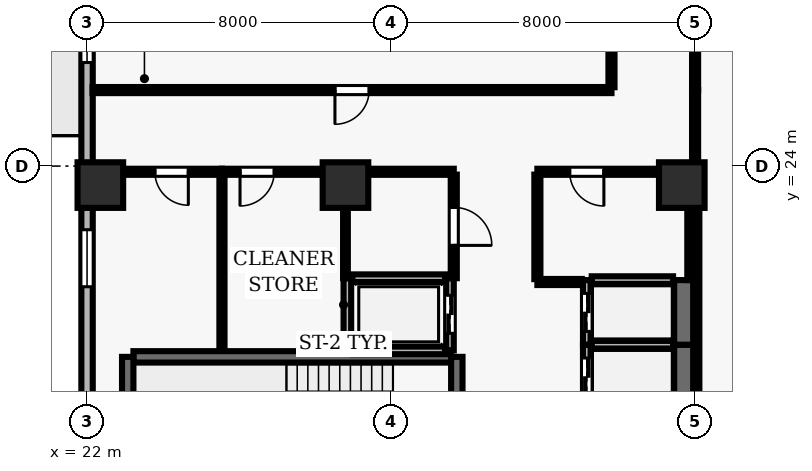
"""IFC4 building model, lengths in metres.
Left out: names, types, materials, properties, quantities, classifications, styles, units other than length and angle.
Written with IfcOpenShell. Run it as: python <this file> out.ifc"""

import sys

from ifc_helpers import new_model, si_unit, direction, frame, frame_2d, origin, origin_2d, place, context, subcontext, project, spatial, rectangle, extrude, element, fill, save


model = new_model("IFC4")
c1 = context("Model", 3, precision=1e-05, world=origin(), true_north=direction((0.0, 1.0)))
c2 = subcontext(c1, "Body", "Model", "MODEL_VIEW")
j1 = project(units=[si_unit("LENGTHUNIT", "METRE"), si_unit("PLANEANGLEUNIT", "RADIAN")], contexts=[c1])
p1 = place(None, origin())
s1 = spatial("IfcSite", under=j1, at=p1, CompositionType="ELEMENT")
p2 = place(p1, origin())
s2 = spatial("IfcBuilding", under=s1, at=p2, CompositionType="ELEMENT")
p3 = place(p2, frame((0.0, 0.0, 122.9)))
s3 = spatial("IfcBuildingStorey", under=s2, at=p3, CompositionType="ELEMENT", Elevation=122.9)
for number, where, z_axis, x_axis in (
    (1, (22.35, 23.5, 0.0), (0.0, 0.0, 1.0), (1.0, 0.0, 0.0)),
    (2, (28.8, 23.5, 0.0), (0.0, 0.0, 1.0), (1.0, 0.0, 0.0)),
    (3, (37.65, 23.5, 0.0), (0.0, 0.0, 1.0), (1.0, 0.0, 0.0)),
):
    element("IfcColumn", number, at=place(p3, frame(where, z_axis=z_axis, x_axis=x_axis)), inside=s3, PredefinedType="COLUMN", context=c2, shape_type="SweptSolid", body=[
        extrude(rectangle(XDim=1.2, YDim=1.2, at=origin_2d()), origin(), (0.0, 0.0, 1.0), 3.9),
    ])
p4 = place(p3, frame((22.0, 46.1, 0.0), z_axis=(0.0, 0.0, 1.0), x_axis=(0.0, -1.0, 0.0)))
e4 = element("IfcWall", 4, at=p4, inside=s3, PredefinedType="SOLIDWALL", context=c2, shape_type="SweptSolid", body=[
    extrude(rectangle(XDim=43.6, YDim=0.3, at=frame_2d((21.8, 0.0))), origin(), (0.0, 0.0, 1.0), 3.69),
])
p5 = place(p4, frame((12.7, 0.0, 0.0)))
e5 = element("IfcOpeningElement", 5, at=p5, cuts=e4, PredefinedType="OPENING", context=c2, shape_type="SweptSolid", body=[
    extrude(rectangle(XDim=1.0, YDim=2.2, at=frame_2d((0.5, 1.1))), frame((0.0, 0.16, 0.0), z_axis=(0.0, -1.0, 0.0), x_axis=(1.0, 0.0, 0.0)), (0.0, 0.0, 1.0), 0.32),
])
p6 = place(p4, frame((1.975, 0.0, 0.9)))
e6 = element("IfcOpeningElement", 6, at=p6, cuts=e4, PredefinedType="OPENING", context=c2, shape_type="SweptSolid", body=[
    extrude(rectangle(XDim=1.5, YDim=1.8, at=frame_2d((0.75, 0.9))), frame((0.0, 0.16, 0.0), z_axis=(0.0, -1.0, 0.0), x_axis=(1.0, 0.0, 0.0)), (0.0, 0.0, 1.0), 0.32),
])
p7 = place(p4, frame((6.975, 0.0, 0.9)))
e7 = element("IfcOpeningElement", 7, at=p7, cuts=e4, PredefinedType="OPENING", context=c2, shape_type="SweptSolid", body=[
    extrude(rectangle(XDim=1.5, YDim=1.8, at=frame_2d((0.75, 0.9))), frame((0.0, 0.16, 0.0), z_axis=(0.0, -1.0, 0.0), x_axis=(1.0, 0.0, 0.0)), (0.0, 0.0, 1.0), 0.32),
])
p8 = place(p4, frame((17.875, 0.0, 0.9)))
e8 = element("IfcOpeningElement", 8, at=p8, cuts=e4, PredefinedType="OPENING", context=c2, shape_type="SweptSolid", body=[
    extrude(rectangle(XDim=1.5, YDim=1.8, at=frame_2d((0.75, 0.9))), frame((0.0, 0.16, 0.0), z_axis=(0.0, -1.0, 0.0), x_axis=(1.0, 0.0, 0.0)), (0.0, 0.0, 1.0), 0.32),
])
p9 = place(p4, frame((23.775, 0.0, 0.9)))
e9 = element("IfcOpeningElement", 9, at=p9, cuts=e4, PredefinedType="OPENING", context=c2, shape_type="SweptSolid", body=[
    extrude(rectangle(XDim=1.5, YDim=1.8, at=frame_2d((0.75, 0.9))), frame((0.0, 0.16, 0.0), z_axis=(0.0, -1.0, 0.0), x_axis=(1.0, 0.0, 0.0)), (0.0, 0.0, 1.0), 0.32),
])
p10 = place(p4, frame((28.775, 0.0, 0.9)))
e10 = element("IfcOpeningElement", 10, at=p10, cuts=e4, PredefinedType="OPENING", context=c2, shape_type="SweptSolid", body=[
    extrude(rectangle(XDim=1.5, YDim=1.8, at=frame_2d((0.75, 0.9))), frame((0.0, 0.16, 0.0), z_axis=(0.0, -1.0, 0.0), x_axis=(1.0, 0.0, 0.0)), (0.0, 0.0, 1.0), 0.32),
])
p11 = place(p4, frame((34.675, 0.0, 0.9)))
e11 = element("IfcOpeningElement", 11, at=p11, cuts=e4, PredefinedType="OPENING", context=c2, shape_type="SweptSolid", body=[
    extrude(rectangle(XDim=1.5, YDim=1.8, at=frame_2d((0.75, 0.9))), frame((0.0, 0.16, 0.0), z_axis=(0.0, -1.0, 0.0), x_axis=(1.0, 0.0, 0.0)), (0.0, 0.0, 1.0), 0.32),
])
p12 = place(p3, frame((31.58, 18.98, 0.0), z_axis=(0.0, 0.0, 1.0), x_axis=(-1.0, 0.0, 0.0)))
e12 = element("IfcWall", 12, at=p12, inside=s3, PredefinedType="SHEAR", context=c2, shape_type="SweptSolid", body=[
    extrude(rectangle(XDim=8.36, YDim=0.3, at=frame_2d((4.18, 0.0))), origin(), (0.0, 0.0, 1.0), 3.69),
])
p13 = place(p3, frame((23.07, 18.98, 0.0), z_axis=(0.0, 0.0, 1.0), x_axis=(0.0, -1.0, 0.0)))
e13 = element("IfcWall", 13, at=p13, inside=s3, PredefinedType="SHEAR", context=c2, shape_type="SweptSolid", body=[
    extrude(rectangle(XDim=3.51, YDim=0.3, at=frame_2d((1.755, 0.0))), origin(), (0.0, 0.0, 1.0), 3.69),
])
p14 = place(p3, frame((31.73, 15.47, 0.0), z_axis=(0.0, 0.0, 1.0), x_axis=(0.0, 1.0, 0.0)))
e14 = element("IfcWall", 14, at=p14, inside=s3, PredefinedType="SHEAR", context=c2, shape_type="SweptSolid", body=[
    extrude(rectangle(XDim=3.51, YDim=0.3, at=frame_2d((1.755, 0.0))), origin(), (0.0, 0.0, 1.0), 3.69),
])
p15 = place(p14, frame((1.18, 0.0, 0.0)))
e15 = element("IfcOpeningElement", 15, at=p15, cuts=e14, PredefinedType="OPENING", context=c2, shape_type="SweptSolid", body=[
    extrude(rectangle(XDim=1.15, YDim=2.15, at=frame_2d((0.575, 1.075))), frame((0.0, 0.16, 0.0), z_axis=(0.0, -1.0, 0.0), x_axis=(1.0, 0.0, 0.0)), (0.0, 0.0, 1.0), 0.32),
])
p16 = place(p3, frame((35.15, 19.3, 0.0), z_axis=(0.0, 0.0, 1.0), x_axis=(0.0, -1.0, 0.0)))
e16 = element("IfcWall", 16, at=p16, inside=s3, PredefinedType="SOLIDWALL", context=c2, shape_type="SweptSolid", body=[
    extrude(rectangle(XDim=1.7, YDim=0.2, at=frame_2d((0.85, 0.0))), origin(), (0.0, 0.0, 1.0), 3.69),
])
p17 = place(p16, frame((0.35, 0.0, 0.0)))
e17 = element("IfcOpeningElement", 17, at=p17, cuts=e16, PredefinedType="OPENING", context=c2, shape_type="SweptSolid", body=[
    extrude(rectangle(XDim=1.0, YDim=2.1, at=frame_2d((0.5, 1.05))), frame((0.0, 0.11, 0.0), z_axis=(0.0, -1.0, 0.0), x_axis=(1.0, 0.0, 0.0)), (0.0, 0.0, 1.0), 0.22),
])
p18 = place(p3, frame((37.7, 17.6, 0.0), z_axis=(0.0, 0.0, 1.0), x_axis=(0.0, 1.0, 0.0)))
e18 = element("IfcWall", 18, at=p18, inside=s3, PredefinedType="SHEAR", context=c2, shape_type="SweptSolid", body=[
    extrude(rectangle(XDim=1.7, YDim=0.5, at=frame_2d((0.85, 0.0))), origin(), (0.0, 0.0, 1.0), 3.69),
])
p19 = place(p3, frame((37.42, 19.3, 0.0), z_axis=(0.0, 0.0, 1.0), x_axis=(-1.0, 0.0, 0.0)))
e19 = element("IfcWall", 19, at=p19, inside=s3, PredefinedType="SOLIDWALL", context=c2, shape_type="SweptSolid", body=[
    extrude(rectangle(XDim=2.14, YDim=0.2, at=frame_2d((1.07, 0.0))), origin(), (0.0, 0.0, 1.0), 3.69),
])
p20 = place(p3, frame((35.15, 21.0, 0.0), z_axis=(0.0, 0.0, 1.0), x_axis=(0.0, -1.0, 0.0)))
e20 = element("IfcWall", 20, at=p20, inside=s3, PredefinedType="SOLIDWALL", context=c2, shape_type="SweptSolid", body=[
    extrude(rectangle(XDim=1.7, YDim=0.2, at=frame_2d((0.85, 0.0))), origin(), (0.0, 0.0, 1.0), 3.69),
])
p21 = place(p20, frame((0.35, 0.0, 0.0)))
e21 = element("IfcOpeningElement", 21, at=p21, cuts=e20, PredefinedType="OPENING", context=c2, shape_type="SweptSolid", body=[
    extrude(rectangle(XDim=1.0, YDim=2.1, at=frame_2d((0.5, 1.05))), frame((0.0, 0.11, 0.0), z_axis=(0.0, -1.0, 0.0), x_axis=(1.0, 0.0, 0.0)), (0.0, 0.0, 1.0), 0.22),
])
p22 = place(p3, frame((37.7, 19.3, 0.0), z_axis=(0.0, 0.0, 1.0), x_axis=(0.0, 1.0, 0.0)))
e22 = element("IfcWall", 22, at=p22, inside=s3, PredefinedType="SHEAR", context=c2, shape_type="SweptSolid", body=[
    extrude(rectangle(XDim=1.7, YDim=0.5, at=frame_2d((0.85, 0.0))), origin(), (0.0, 0.0, 1.0), 3.69),
])
p23 = place(p3, frame((37.42, 21.0, 0.0), z_axis=(0.0, 0.0, 1.0), x_axis=(-1.0, 0.0, 0.0)))
e23 = element("IfcWall", 23, at=p23, inside=s3, PredefinedType="SOLIDWALL", context=c2, shape_type="SweptSolid", body=[
    extrude(rectangle(XDim=2.14, YDim=0.2, at=frame_2d((1.07, 0.0))), origin(), (0.0, 0.0, 1.0), 3.69),
])
p24 = place(p3, frame((28.85, 21.05, 0.0), z_axis=(0.0, 0.0, 1.0), x_axis=(0.0, -1.0, 0.0)))
e24 = element("IfcWall", 24, at=p24, inside=s3, PredefinedType="SOLIDWALL", context=c2, shape_type="SweptSolid", body=[
    extrude(rectangle(XDim=1.9, YDim=0.2, at=frame_2d((0.95, 0.0))), origin(), (0.0, 0.0, 1.0), 3.69),
])
p25 = place(p3, frame((31.55, 19.15, 0.0), z_axis=(0.0, 0.0, 1.0), x_axis=(0.0, 1.0, 0.0)))
e25 = element("IfcWall", 25, at=p25, inside=s3, PredefinedType="SOLIDWALL", context=c2, shape_type="SweptSolid", body=[
    extrude(rectangle(XDim=1.9, YDim=0.2, at=frame_2d((0.95, 0.0))), origin(), (0.0, 0.0, 1.0), 3.69),
])
p26 = place(p25, frame((0.45, 0.0, 0.0)))
e26 = element("IfcOpeningElement", 26, at=p26, cuts=e25, PredefinedType="OPENING", context=c2, shape_type="SweptSolid", body=[
    extrude(rectangle(XDim=1.0, YDim=2.1, at=frame_2d((0.5, 1.05))), frame((0.0, 0.11, 0.0), z_axis=(0.0, -1.0, 0.0), x_axis=(1.0, 0.0, 0.0)), (0.0, 0.0, 1.0), 0.22),
])
for number, where, z_axis, x_axis in (
    (27, (28.98, 19.15, 0.0), (0.0, 0.0, 1.0), (1.0, 0.0, 0.0)),
    (28, (31.42, 21.05, 0.0), (0.0, 0.0, 1.0), (-1.0, 0.0, 0.0)),
):
    element("IfcWall", number, at=place(p3, frame(where, z_axis=z_axis, x_axis=x_axis)), inside=s3, PredefinedType="SOLIDWALL", context=c2, shape_type="SweptSolid", body=[
        extrude(rectangle(XDim=2.44, YDim=0.2, at=frame_2d((1.22, 0.0))), origin(), (0.0, 0.0, 1.0), 3.69),
    ])
p27 = place(p3, frame((25.55, 23.85, 0.0), z_axis=(0.0, 0.0, 1.0), x_axis=(-1.0, 0.0, 0.0)))
e29 = element("IfcWall", 29, at=p27, inside=s3, PredefinedType="PARTITIONING", context=c2, shape_type="SweptSolid", body=[
    extrude(rectangle(XDim=3.35, YDim=0.16, at=frame_2d((1.675, 0.0))), origin(), (0.0, 0.0, 1.0), 3.073),
])
p28 = place(p27, frame((0.885, 0.0, 0.0)))
e30 = element("IfcOpeningElement", 30, at=p28, cuts=e29, PredefinedType="OPENING", context=c2, shape_type="SweptSolid", body=[
    extrude(rectangle(XDim=0.88, YDim=2.1, at=frame_2d((0.44, 1.05))), frame((0.0, 0.09, 0.0), z_axis=(0.0, -1.0, 0.0), x_axis=(1.0, 0.0, 0.0)), (0.0, 0.0, 1.0), 0.18),
])
p29 = place(p3, frame((28.8, 23.85, 0.0), z_axis=(0.0, 0.0, 1.0), x_axis=(-1.0, 0.0, 0.0)))
e31 = element("IfcWall", 31, at=p29, inside=s3, PredefinedType="PARTITIONING", context=c2, shape_type="SweptSolid", body=[
    extrude(rectangle(XDim=3.25, YDim=0.16, at=frame_2d((1.625, 0.0))), origin(), (0.0, 0.0, 1.0), 3.073),
])
p30 = place(p29, frame((1.875, 0.0, 0.0)))
e32 = element("IfcOpeningElement", 32, at=p30, cuts=e31, PredefinedType="OPENING", context=c2, shape_type="SweptSolid", body=[
    extrude(rectangle(XDim=0.9, YDim=2.1, at=frame_2d((0.45, 1.05))), frame((0.0, 0.09, 0.0), z_axis=(0.0, -1.0, 0.0), x_axis=(1.0, 0.0, 0.0)), (0.0, 0.0, 1.0), 0.18),
])
p31 = place(p3, frame((31.65, 23.85, 0.0), z_axis=(0.0, 0.0, 1.0), x_axis=(-1.0, 0.0, 0.0)))
e33 = element("IfcWall", 33, at=p31, inside=s3, PredefinedType="PARTITIONING", context=c2, shape_type="SweptSolid", body=[
    extrude(rectangle(XDim=2.85, YDim=0.16, at=frame_2d((1.425, 0.0))), origin(), (0.0, 0.0, 1.0), 3.073),
])
p32 = place(p3, frame((35.02, 20.95, 0.0), z_axis=(0.0, 0.0, 1.0), x_axis=(-1.0, 0.0, 0.0)))
e34 = element("IfcWall", 34, at=p32, inside=s3, PredefinedType="PARTITIONING", context=c2, shape_type="SweptSolid", body=[
    extrude(rectangle(XDim=1.17, YDim=0.16, at=frame_2d((0.585, 0.0))), origin(), (0.0, 0.0, 1.0), 3.69),
])
p33 = place(p3, frame((35.8, 26.0, 0.0), z_axis=(0.0, 0.0, 1.0), x_axis=(-1.0, 0.0, 0.0)))
e35 = element("IfcWall", 35, at=p33, inside=s3, PredefinedType="PARTITIONING", context=c2, shape_type="SweptSolid", body=[
    extrude(rectangle(XDim=13.655, YDim=0.16, at=frame_2d((6.828, 0.0))), origin(), (0.0, 0.0, 1.0), 3.69),
])
p34 = place(p33, frame((6.377, 0.0, 0.0)))
e36 = element("IfcOpeningElement", 36, at=p34, cuts=e35, PredefinedType="OPENING", context=c2, shape_type="SweptSolid", body=[
    extrude(rectangle(XDim=0.9, YDim=2.1, at=frame_2d((0.45, 1.05))), frame((0.0, 0.09, 0.0), z_axis=(0.0, -1.0, 0.0), x_axis=(1.0, 0.0, 0.0)), (0.0, 0.0, 1.0), 0.18),
])
p35 = place(p3, frame((37.85, 23.85, 0.0), z_axis=(0.0, 0.0, 1.0), x_axis=(-1.0, 0.0, 0.0)))
e37 = element("IfcWall", 37, at=p35, inside=s3, PredefinedType="PARTITIONING", context=c2, shape_type="SweptSolid", body=[
    extrude(rectangle(XDim=4.0, YDim=0.16, at=frame_2d((2.0, 0.0))), origin(), (0.0, 0.0, 1.0), 3.073),
])
p36 = place(p35, frame((2.25, 0.0, 0.0)))
e38 = element("IfcOpeningElement", 38, at=p36, cuts=e37, PredefinedType="OPENING", context=c2, shape_type="SweptSolid", body=[
    extrude(rectangle(XDim=0.9, YDim=2.1, at=frame_2d((0.45, 1.05))), frame((0.0, 0.09, 0.0), z_axis=(0.0, -1.0, 0.0), x_axis=(1.0, 0.0, 0.0)), (0.0, 0.0, 1.0), 0.18),
])
p37 = place(p3, frame((25.55, 19.16, 0.0), z_axis=(0.0, 0.0, 1.0), x_axis=(0.0, 1.0, 0.0)))
e39 = element("IfcWall", 39, at=p37, inside=s3, PredefinedType="PARTITIONING", context=c2, shape_type="SweptSolid", body=[
    extrude(rectangle(XDim=4.615, YDim=0.135, at=frame_2d((2.308, 0.0))), origin(), (0.0, 0.0, 1.0), 3.69),
])
p38 = place(p3, frame((28.8, 23.775, 0.0), z_axis=(0.0, 0.0, 1.0), x_axis=(0.0, -1.0, 0.0)))
e40 = element("IfcWall", 40, at=p38, inside=s3, PredefinedType="PARTITIONING", context=c2, shape_type="SweptSolid", body=[
    extrude(rectangle(XDim=2.725, YDim=0.125, at=frame_2d((1.362, 0.0))), origin(), (0.0, 0.0, 1.0), 3.69),
])
p39 = place(p3, frame((31.65, 23.775, 0.0), z_axis=(0.0, 0.0, 1.0), x_axis=(0.0, -1.0, 0.0)))
e41 = element("IfcWall", 41, at=p39, inside=s3, PredefinedType="PARTITIONING", context=c2, shape_type="SweptSolid", body=[
    extrude(rectangle(XDim=2.725, YDim=0.16, at=frame_2d((1.362, 0.0))), origin(), (0.0, 0.0, 1.0), 3.69),
])
p40 = place(p39, frame((0.862, 0.0, 0.0)))
e42 = element("IfcOpeningElement", 42, at=p40, cuts=e41, PredefinedType="OPENING", context=c2, shape_type="SweptSolid", body=[
    extrude(rectangle(XDim=1.0, YDim=2.1, at=frame_2d((0.5, 1.05))), frame((0.0, 0.09, 0.0), z_axis=(0.0, -1.0, 0.0), x_axis=(1.0, 0.0, 0.0)), (0.0, 0.0, 1.0), 0.18),
])
p41 = place(p3, frame((33.85, 21.025, 0.0), z_axis=(0.0, 0.0, 1.0), x_axis=(0.0, 1.0, 0.0)))
e43 = element("IfcWall", 43, at=p41, inside=s3, PredefinedType="PARTITIONING", context=c2, shape_type="SweptSolid", body=[
    extrude(rectangle(XDim=2.75, YDim=0.16, at=frame_2d((1.375, 0.0))), origin(), (0.0, 0.0, 1.0), 3.69),
])
p42 = place(p3, frame((35.8, 36.793, 0.0), z_axis=(0.0, 0.0, 1.0), x_axis=(0.0, -1.0, 0.0)))
e44 = element("IfcWall", 44, at=p42, inside=s3, PredefinedType="PARTITIONING", context=c2, shape_type="SweptSolid", body=[
    extrude(rectangle(XDim=10.718, YDim=0.16, at=frame_2d((5.359, 0.0))), origin(), (0.0, 0.0, 1.0), 3.69),
])
p43 = place(p3, frame((37.85, 21.0, 0.0), z_axis=(0.0, 0.0, 1.0), x_axis=(0.0, 1.0, 0.0)))
e45 = element("IfcWall", 45, at=p43, inside=s3, PredefinedType="MOVABLE", context=c2, shape_type="SweptSolid", body=[
    extrude(rectangle(XDim=2.775, YDim=0.11, at=frame_2d((1.387, 0.0))), origin(), (0.0, 0.0, 1.0), 3.073),
])
p44 = place(p3, frame((38.0, 23.85, 0.0), z_axis=(0.0, 0.0, 1.0), x_axis=(0.0, 1.0, 0.0)))
e46 = element("IfcWall", 46, at=p44, inside=s3, PredefinedType="PARTITIONING", context=c2, shape_type="SweptSolid", body=[
    extrude(rectangle(XDim=2.15, YDim=0.16, at=frame_2d((1.075, 0.0))), origin(), (0.0, 0.0, 1.0), 3.073),
])
p45 = place(p3, frame((38.0, 26.0, 0.0), z_axis=(0.0, 0.0, 1.0), x_axis=(0.0, 1.0, 0.0)))
e47 = element("IfcWall", 47, at=p45, inside=s3, PredefinedType="PARTITIONING", context=c2, shape_type="SweptSolid", body=[
    extrude(rectangle(XDim=1.755, YDim=0.16, at=frame_2d((0.877, 0.0))), origin(), (0.0, 0.0, 1.0), 3.073),
])
p46 = place(p3, frame((38.05, 23.85, 0.0), z_axis=(0.0, 0.0, 1.0), x_axis=(0.0, -1.0, 0.0)))
e48 = element("IfcWall", 48, at=p46, inside=s3, PredefinedType="PARTITIONING", context=c2, shape_type="SweptSolid", body=[
    extrude(rectangle(XDim=7.775, YDim=0.125, at=frame_2d((3.888, 0.0))), origin(), (0.0, 0.0, 1.0), 3.073),
])
p47 = place(p8, origin())
e49 = element("IfcWindow", 49, at=p47, inside=s3, PartitioningType="SINGLE_PANEL", PredefinedType="WINDOW", context=c2, shape_type="SweptSolid", body=[
    extrude(rectangle(XDim=1.5, YDim=1.8, at=frame_2d((0.75, 0.9))), frame((0.0, 0.03, 0.0), z_axis=(0.0, -1.0, 0.0), x_axis=(1.0, 0.0, 0.0)), (0.0, 0.0, 1.0), 0.06),
])
fill(e8, e49)
p48 = place(p9, origin())
e50 = element("IfcWindow", 50, at=p48, inside=s3, PartitioningType="SINGLE_PANEL", PredefinedType="WINDOW", context=c2, shape_type="SweptSolid", body=[
    extrude(rectangle(XDim=1.5, YDim=1.8, at=frame_2d((0.75, 0.9))), frame((0.0, 0.03, 0.0), z_axis=(0.0, -1.0, 0.0), x_axis=(1.0, 0.0, 0.0)), (0.0, 0.0, 1.0), 0.06),
])
fill(e9, e50)
p49 = place(p17, origin())
e51 = element("IfcDoor", 51, at=p49, inside=s3, OperationType="DOUBLE_DOOR_SLIDING", PredefinedType="DOOR", context=c2, shape_type="SweptSolid", body=[
    extrude(rectangle(XDim=1.0, YDim=2.1, at=frame_2d((0.5, 1.05))), frame((0.0, 0.025, 0.0), z_axis=(0.0, -1.0, 0.0), x_axis=(1.0, 0.0, 0.0)), (0.0, 0.0, 1.0), 0.05),
])
fill(e17, e51)
p50 = place(p21, origin())
e52 = element("IfcDoor", 52, at=p50, inside=s3, OperationType="DOUBLE_DOOR_SLIDING", PredefinedType="DOOR", context=c2, shape_type="SweptSolid", body=[
    extrude(rectangle(XDim=1.0, YDim=2.1, at=frame_2d((0.5, 1.05))), frame((0.0, 0.025, 0.0), z_axis=(0.0, -1.0, 0.0), x_axis=(1.0, 0.0, 0.0)), (0.0, 0.0, 1.0), 0.05),
])
fill(e21, e52)
p51 = place(p26, origin())
e53 = element("IfcDoor", 53, at=p51, inside=s3, OperationType="DOUBLE_DOOR_SLIDING", PredefinedType="DOOR", context=c2, shape_type="SweptSolid", body=[
    extrude(rectangle(XDim=1.0, YDim=2.1, at=frame_2d((0.5, 1.05))), frame((0.0, 0.025, 0.0), z_axis=(0.0, -1.0, 0.0), x_axis=(1.0, 0.0, 0.0)), (0.0, 0.0, 1.0), 0.05),
])
fill(e26, e53)
p52 = place(p36, origin())
e54 = element("IfcDoor", 54, at=p52, inside=s3, OperationType="SINGLE_SWING_LEFT", PredefinedType="DOOR", context=c2, shape_type="SweptSolid", body=[
    extrude(rectangle(XDim=0.9, YDim=2.1, at=frame_2d((0.45, 1.05))), frame((0.0, 0.025, 0.0), z_axis=(0.0, -1.0, 0.0), x_axis=(1.0, 0.0, 0.0)), (0.0, 0.0, 1.0), 0.05),
])
fill(e38, e54)
p53 = place(p40, origin())
e55 = element("IfcDoor", 55, at=p53, inside=s3, OperationType="SINGLE_SWING_RIGHT", PredefinedType="DOOR", context=c2, shape_type="SweptSolid", body=[
    extrude(rectangle(XDim=1.0, YDim=2.1, at=frame_2d((0.5, 1.05))), frame((0.0, 0.025, 0.0), z_axis=(0.0, -1.0, 0.0), x_axis=(1.0, 0.0, 0.0)), (0.0, 0.0, 1.0), 0.05),
])
fill(e42, e55)
p54 = place(p28, origin())
e56 = element("IfcDoor", 56, at=p54, inside=s3, OperationType="SINGLE_SWING_LEFT", PredefinedType="DOOR", context=c2, shape_type="SweptSolid", body=[
    extrude(rectangle(XDim=0.88, YDim=2.1, at=frame_2d((0.44, 1.05))), frame((0.0, 0.025, 0.0), z_axis=(0.0, -1.0, 0.0), x_axis=(1.0, 0.0, 0.0)), (0.0, 0.0, 1.0), 0.05),
])
fill(e30, e56)
p55 = place(p30, origin())
e57 = element("IfcDoor", 57, at=p55, inside=s3, OperationType="SINGLE_SWING_RIGHT", PredefinedType="DOOR", context=c2, shape_type="SweptSolid", body=[
    extrude(rectangle(XDim=0.9, YDim=2.1, at=frame_2d((0.45, 1.05))), frame((0.0, 0.025, 0.0), z_axis=(0.0, -1.0, 0.0), x_axis=(1.0, 0.0, 0.0)), (0.0, 0.0, 1.0), 0.05),
])
fill(e32, e57)
p56 = place(p34, origin())
e58 = element("IfcDoor", 58, at=p56, inside=s3, OperationType="SINGLE_SWING_RIGHT", PredefinedType="DOOR", context=c2, shape_type="SweptSolid", body=[
    extrude(rectangle(XDim=0.9, YDim=2.1, at=frame_2d((0.45, 1.05))), frame((0.0, 0.025, 0.0), z_axis=(0.0, -1.0, 0.0), x_axis=(1.0, 0.0, 0.0)), (0.0, 0.0, 1.0), 0.05),
])
fill(e36, e58)
save(model, sys.argv[1])
